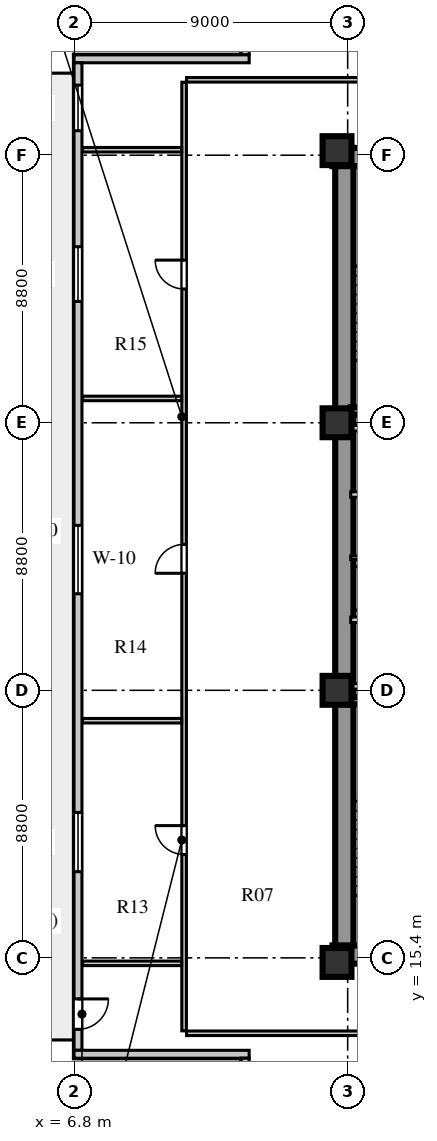
"""IFC4 building model, lengths in metres.
Left out: names, types, materials, properties, quantities, classifications, styles, units other than length and angle.
Written with IfcOpenShell. Run it as: python <this file> out.ifc"""

import sys

from ifc_helpers import new_model, si_unit, direction, frame, frame_2d, origin, origin_2d, place, context, subcontext, project, spatial, rectangle, extrude, element, fill, save


model = new_model("IFC4")
c1 = context("Model", 3, precision=1e-05, world=origin(), true_north=direction((0.0, 1.0)))
c2 = subcontext(c1, "Body", "Model", "MODEL_VIEW")
j1 = project(units=[si_unit("LENGTHUNIT", "METRE"), si_unit("PLANEANGLEUNIT", "RADIAN")], contexts=[c1])
p1 = place(None, origin())
s1 = spatial("IfcSite", under=j1, at=p1, CompositionType="ELEMENT")
p2 = place(p1, origin())
s2 = spatial("IfcBuilding", under=s1, at=p2, CompositionType="ELEMENT")
p3 = place(p2, frame((0.0, 0.0, 58.0)))
s3 = spatial("IfcBuildingStorey", under=s2, at=p3, CompositionType="ELEMENT", Elevation=58.0)
for number, where, z_axis, x_axis in (
    (1, (15.3, 15.51, 0.0), (0.0, 0.0, 1.0), (1.0, 0.0, 0.0)),
    (2, (15.3, 41.74, 0.0), (0.0, 0.0, 1.0), (1.0, 0.0, 0.0)),
):
    element("IfcWall", number, at=place(p3, frame(where, z_axis=z_axis, x_axis=x_axis)), inside=s3, PredefinedType="SHEAR", context=c2, shape_type="SweptSolid", body=[
        extrude(rectangle(XDim=9.88, YDim=0.6, at=frame_2d((4.94, 0.0))), origin(), (0.0, 0.0, 1.0), 3.72),
    ])
p4 = place(p3, frame((15.69, 15.81, 0.0), z_axis=(0.0, 0.0, 1.0), x_axis=(0.0, 1.0, 0.0)))
e3 = element("IfcWall", 3, at=p4, inside=s3, PredefinedType="SHEAR", context=c2, shape_type="SweptSolid", body=[
    extrude(rectangle(XDim=25.63, YDim=0.6, at=frame_2d((12.815, 0.0))), origin(), (0.0, 0.0, 1.0), 3.72),
])
for number, where, z_axis, x_axis in (
    (4, (15.45, 15.25, 0.0), (0.0, 0.0, 1.0), (1.0, 0.0, 0.0)),
    (5, (15.45, 24.2, 0.0), (0.0, 0.0, 1.0), (1.0, 0.0, 0.0)),
    (6, (15.45, 33.0, 0.0), (0.0, 0.0, 1.0), (1.0, 0.0, 0.0)),
    (7, (15.45, 41.95, 0.0), (0.0, 0.0, 1.0), (1.0, 0.0, 0.0)),
):
    element("IfcColumn", number, at=place(p3, frame(where, z_axis=z_axis, x_axis=x_axis)), inside=s3, PredefinedType="COLUMN", context=c2, shape_type="SweptSolid", body=[
        extrude(rectangle(XDim=0.95, YDim=0.95, at=origin_2d()), origin(), (0.0, 0.0, 1.0), 3.72),
    ])
p5 = place(p3, frame((12.43, 50.34, 0.0), z_axis=(0.0, 0.0, 1.0), x_axis=(0.0, -1.0, 0.0)))
e8 = element("IfcWall", 8, at=p5, inside=s3, PredefinedType="SOLIDWALL", context=c2, shape_type="SweptSolid", body=[
    extrude(rectangle(XDim=5.24, YDim=0.26, at=frame_2d((2.62, 0.0))), origin(), (0.0, 0.0, 1.0), 3.72),
])
p6 = place(p3, frame((12.56, 44.97, 0.0), z_axis=(0.0, 0.0, 1.0), x_axis=(-1.0, 0.0, 0.0)))
e9 = element("IfcWall", 9, at=p6, inside=s3, PredefinedType="SOLIDWALL", context=c2, shape_type="SweptSolid", body=[
    extrude(rectangle(XDim=5.76, YDim=0.26, at=frame_2d((2.88, 0.0))), origin(), (0.0, 0.0, 1.0), 3.72),
])
p7 = place(p3, frame((6.93, 44.84, 0.0), z_axis=(0.0, 0.0, 1.0), x_axis=(0.0, -1.0, 0.0)))
e10 = element("IfcWall", 10, at=p7, inside=s3, PredefinedType="SOLIDWALL", context=c2, shape_type="SweptSolid", body=[
    extrude(rectangle(XDim=32.48, YDim=0.26, at=frame_2d((16.24, 0.0))), origin(), (0.0, 0.0, 1.0), 3.72),
])
p8 = place(p7, frame((30.79, 0.0, 0.0)))
e11 = element("IfcOpeningElement", 11, at=p8, cuts=e10, PredefinedType="OPENING", context=c2, shape_type="SweptSolid", body=[
    extrude(rectangle(XDim=1.0, YDim=2.05, at=frame_2d((0.5, 1.025))), frame((0.0, 0.14, 0.0), z_axis=(0.0, -1.0, 0.0), x_axis=(1.0, 0.0, 0.0)), (0.0, 0.0, 1.0), 0.28),
])
p9 = place(p7, frame((24.655, 0.0, 0.8)))
e12 = element("IfcOpeningElement", 12, at=p9, cuts=e10, PredefinedType="OPENING", context=c2, shape_type="SweptSolid", body=[
    extrude(rectangle(XDim=1.95, YDim=2.0, at=frame_2d((0.975, 1.0))), frame((0.0, 0.14, 0.0), z_axis=(0.0, -1.0, 0.0), x_axis=(1.0, 0.0, 0.0)), (0.0, 0.0, 1.0), 0.28),
])
p10 = place(p7, frame((15.215, 0.0, 0.8)))
e13 = element("IfcOpeningElement", 13, at=p10, cuts=e10, PredefinedType="OPENING", context=c2, shape_type="SweptSolid", body=[
    extrude(rectangle(XDim=2.25, YDim=2.0, at=frame_2d((1.125, 1.0))), frame((0.0, 0.14, 0.0), z_axis=(0.0, -1.0, 0.0), x_axis=(1.0, 0.0, 0.0)), (0.0, 0.0, 1.0), 0.28),
])
p11 = place(p7, frame((6.05, 0.0, 0.8)))
e14 = element("IfcOpeningElement", 14, at=p11, cuts=e10, PredefinedType="OPENING", context=c2, shape_type="SweptSolid", body=[
    extrude(rectangle(XDim=1.8, YDim=2.0, at=frame_2d((0.9, 1.0))), frame((0.0, 0.14, 0.0), z_axis=(0.0, -1.0, 0.0), x_axis=(1.0, 0.0, 0.0)), (0.0, 0.0, 1.0), 0.28),
])
p12 = place(p7, frame((0.735, 0.0, 0.8)))
e15 = element("IfcOpeningElement", 15, at=p12, cuts=e10, PredefinedType="OPENING", context=c2, shape_type="SweptSolid", body=[
    extrude(rectangle(XDim=1.5, YDim=2.0, at=frame_2d((0.75, 1.0))), frame((0.0, 0.14, 0.0), z_axis=(0.0, -1.0, 0.0), x_axis=(1.0, 0.0, 0.0)), (0.0, 0.0, 1.0), 0.28),
])
p13 = place(p3, frame((6.8, 12.23, 0.0), z_axis=(0.0, 0.0, 1.0), x_axis=(1.0, 0.0, 0.0)))
e16 = element("IfcWall", 16, at=p13, inside=s3, PredefinedType="SOLIDWALL", context=c2, shape_type="SweptSolid", body=[
    extrude(rectangle(XDim=5.76, YDim=0.26, at=frame_2d((2.88, 0.0))), origin(), (0.0, 0.0, 1.0), 3.72),
])
p14 = place(p3, frame((12.43, 12.1, 0.0), z_axis=(0.0, 0.0, 1.0), x_axis=(0.0, -1.0, 0.0)))
e17 = element("IfcWall", 17, at=p14, inside=s3, PredefinedType="SOLIDWALL", context=c2, shape_type="SweptSolid", body=[
    extrude(rectangle(XDim=5.24, YDim=0.26, at=frame_2d((2.62, 0.0))), origin(), (0.0, 0.0, 1.0), 3.72),
])
p15 = place(p3, frame((15.9, 23.86, 0.0), z_axis=(0.0, 0.0, 1.0), x_axis=(1.0, 0.0, 0.0)))
e18 = element("IfcWall", 18, at=p15, inside=s3, PredefinedType="SHEAR", context=c2, shape_type="SweptSolid", body=[
    extrude(rectangle(XDim=3.52, YDim=0.24, at=frame_2d((1.76, 0.0))), origin(), (0.0, 0.0, 1.0), 4.0),
])
p16 = place(p3, frame((15.9, 26.52, 0.0), z_axis=(0.0, 0.0, 1.0), x_axis=(1.0, 0.0, 0.0)))
e19 = element("IfcWall", 19, at=p16, inside=s3, PredefinedType="SOLIDWALL", context=c2, shape_type="SweptSolid", body=[
    extrude(rectangle(XDim=8.68, YDim=0.18, at=frame_2d((4.34, 0.0))), origin(), (0.0, 0.0, 1.0), 3.72),
])
p17 = place(p16, frame((1.76, 0.0, 0.0)))
e20 = element("IfcOpeningElement", 20, at=p17, cuts=e19, PredefinedType="OPENING", context=c2, shape_type="SweptSolid", body=[
    extrude(rectangle(XDim=1.0, YDim=2.1, at=frame_2d((0.5, 1.05))), frame((0.0, 0.1, 0.0), z_axis=(0.0, -1.0, 0.0), x_axis=(1.0, 0.0, 0.0)), (0.0, 0.0, 1.0), 0.2),
])
p18 = place(p16, frame((3.6, 0.0, 0.0)))
e21 = element("IfcOpeningElement", 21, at=p18, cuts=e19, PredefinedType="OPENING", context=c2, shape_type="SweptSolid", body=[
    extrude(rectangle(XDim=1.0, YDim=2.1, at=frame_2d((0.5, 1.05))), frame((0.0, 0.1, 0.0), z_axis=(0.0, -1.0, 0.0), x_axis=(1.0, 0.0, 0.0)), (0.0, 0.0, 1.0), 0.2),
])
p19 = place(p16, frame((5.44, 0.0, 0.0)))
e22 = element("IfcOpeningElement", 22, at=p19, cuts=e19, PredefinedType="OPENING", context=c2, shape_type="SweptSolid", body=[
    extrude(rectangle(XDim=1.0, YDim=2.1, at=frame_2d((0.5, 1.05))), frame((0.0, 0.1, 0.0), z_axis=(0.0, -1.0, 0.0), x_axis=(1.0, 0.0, 0.0)), (0.0, 0.0, 1.0), 0.2),
])
p20 = place(p16, frame((7.28, 0.0, 0.0)))
e23 = element("IfcOpeningElement", 23, at=p20, cuts=e19, PredefinedType="OPENING", context=c2, shape_type="SweptSolid", body=[
    extrude(rectangle(XDim=1.0, YDim=2.1, at=frame_2d((0.5, 1.05))), frame((0.0, 0.1, 0.0), z_axis=(0.0, -1.0, 0.0), x_axis=(1.0, 0.0, 0.0)), (0.0, 0.0, 1.0), 0.2),
])
p21 = place(p3, frame((15.9, 24.33, 0.0), z_axis=(0.0, 0.0, 1.0), x_axis=(1.0, 0.0, 0.0)))
e24 = element("IfcWall", 24, at=p21, inside=s3, PredefinedType="SOLIDWALL", context=c2, shape_type="SweptSolid", body=[
    extrude(rectangle(XDim=8.68, YDim=0.18, at=frame_2d((4.34, 0.0))), origin(), (0.0, 0.0, 1.0), 3.02),
])
p22 = place(p3, frame((15.9, 28.56, 0.0), z_axis=(0.0, 0.0, 1.0), x_axis=(1.0, 0.0, 0.0)))
e25 = element("IfcWall", 25, at=p22, inside=s3, PredefinedType="PARTITIONING", context=c2, shape_type="SweptSolid", body=[
    extrude(rectangle(XDim=1.2, YDim=0.12, at=frame_2d((0.6, 0.0))), origin(), (0.0, 0.0, 1.0), 3.72),
])
p23 = place(p3, frame((15.9, 30.64, 0.0), z_axis=(0.0, 0.0, 1.0), x_axis=(1.0, 0.0, 0.0)))
e26 = element("IfcWall", 26, at=p23, inside=s3, PredefinedType="SOLIDWALL", context=c2, shape_type="SweptSolid", body=[
    extrude(rectangle(XDim=8.68, YDim=0.18, at=frame_2d((4.34, 0.0))), origin(), (0.0, 0.0, 1.0), 3.72),
])
p24 = place(p23, frame((1.76, 0.0, 0.0)))
e27 = element("IfcOpeningElement", 27, at=p24, cuts=e26, PredefinedType="OPENING", context=c2, shape_type="SweptSolid", body=[
    extrude(rectangle(XDim=1.0, YDim=2.1, at=frame_2d((0.5, 1.05))), frame((0.0, 0.1, 0.0), z_axis=(0.0, -1.0, 0.0), x_axis=(1.0, 0.0, 0.0)), (0.0, 0.0, 1.0), 0.2),
])
p25 = place(p23, frame((3.6, 0.0, 0.0)))
e28 = element("IfcOpeningElement", 28, at=p25, cuts=e26, PredefinedType="OPENING", context=c2, shape_type="SweptSolid", body=[
    extrude(rectangle(XDim=1.0, YDim=2.1, at=frame_2d((0.5, 1.05))), frame((0.0, 0.1, 0.0), z_axis=(0.0, -1.0, 0.0), x_axis=(1.0, 0.0, 0.0)), (0.0, 0.0, 1.0), 0.2),
])
p26 = place(p23, frame((5.44, 0.0, 0.0)))
e29 = element("IfcOpeningElement", 29, at=p26, cuts=e26, PredefinedType="OPENING", context=c2, shape_type="SweptSolid", body=[
    extrude(rectangle(XDim=1.0, YDim=2.1, at=frame_2d((0.5, 1.05))), frame((0.0, 0.1, 0.0), z_axis=(0.0, -1.0, 0.0), x_axis=(1.0, 0.0, 0.0)), (0.0, 0.0, 1.0), 0.2),
])
p27 = place(p23, frame((7.28, 0.0, 0.0)))
e30 = element("IfcOpeningElement", 30, at=p27, cuts=e26, PredefinedType="OPENING", context=c2, shape_type="SweptSolid", body=[
    extrude(rectangle(XDim=1.0, YDim=2.1, at=frame_2d((0.5, 1.05))), frame((0.0, 0.1, 0.0), z_axis=(0.0, -1.0, 0.0), x_axis=(1.0, 0.0, 0.0)), (0.0, 0.0, 1.0), 0.2),
])
p28 = place(p3, frame((15.9, 32.82, 0.0), z_axis=(0.0, 0.0, 1.0), x_axis=(1.0, 0.0, 0.0)))
e31 = element("IfcWall", 31, at=p28, inside=s3, PredefinedType="SOLIDWALL", context=c2, shape_type="SweptSolid", body=[
    extrude(rectangle(XDim=8.68, YDim=0.18, at=frame_2d((4.34, 0.0))), origin(), (0.0, 0.0, 1.0), 3.02),
])
p29 = place(p3, frame((15.9, 33.39, 0.0), z_axis=(0.0, 0.0, 1.0), x_axis=(1.0, 0.0, 0.0)))
e32 = element("IfcWall", 32, at=p29, inside=s3, PredefinedType="SHEAR", context=c2, shape_type="SweptSolid", body=[
    extrude(rectangle(XDim=3.52, YDim=0.24, at=frame_2d((1.76, 0.0))), origin(), (0.0, 0.0, 1.0), 4.0),
])
p30 = place(p3, frame((10.42, 13.0, 0.0), z_axis=(0.0, 0.0, 1.0), x_axis=(0.0, 1.0, 0.0)))
e33 = element("IfcWall", 33, at=p30, inside=s3, PredefinedType="PARTITIONING", context=c2, shape_type="SweptSolid", body=[
    extrude(rectangle(XDim=31.2, YDim=0.15, at=frame_2d((15.6, 0.0))), origin(), (0.0, 0.0, 1.0), 3.72),
])
p31 = place(p30, frame((5.8, 0.0, 0.0)))
e34 = element("IfcOpeningElement", 34, at=p31, cuts=e33, PredefinedType="OPENING", context=c2, shape_type="SweptSolid", body=[
    extrude(rectangle(XDim=0.95, YDim=2.08, at=frame_2d((0.475, 1.04))), frame((0.0, 0.085, 0.0), z_axis=(0.0, -1.0, 0.0), x_axis=(1.0, 0.0, 0.0)), (0.0, 0.0, 1.0), 0.17),
])
p32 = place(p30, frame((15.05, 0.0, 0.0)))
e35 = element("IfcOpeningElement", 35, at=p32, cuts=e33, PredefinedType="OPENING", context=c2, shape_type="SweptSolid", body=[
    extrude(rectangle(XDim=0.95, YDim=2.08, at=frame_2d((0.475, 1.04))), frame((0.0, 0.085, 0.0), z_axis=(0.0, -1.0, 0.0), x_axis=(1.0, 0.0, 0.0)), (0.0, 0.0, 1.0), 0.17),
])
p33 = place(p30, frame((24.4, 0.0, 0.0)))
e36 = element("IfcOpeningElement", 36, at=p33, cuts=e33, PredefinedType="OPENING", context=c2, shape_type="SweptSolid", body=[
    extrude(rectangle(XDim=0.95, YDim=2.08, at=frame_2d((0.475, 1.04))), frame((0.0, 0.085, 0.0), z_axis=(0.0, -1.0, 0.0), x_axis=(1.0, 0.0, 0.0)), (0.0, 0.0, 1.0), 0.17),
])
for number, where, z_axis, x_axis in (
    (37, (7.08, 15.22, 0.0), (0.0, 0.0, 1.0), (1.0, 0.0, 0.0)),
    (38, (7.08, 41.98, 0.0), (0.0, 0.0, 1.0), (1.0, 0.0, 0.0)),
):
    element("IfcWall", number, at=place(p3, frame(where, z_axis=z_axis, x_axis=x_axis)), inside=s3, PredefinedType="PARTITIONING", context=c2, shape_type="SweptSolid", body=[
        extrude(rectangle(XDim=3.26, YDim=0.15, at=frame_2d((1.63, 0.0))), origin(), (0.0, 0.0, 1.0), 3.22),
    ])
p34 = place(p3, frame((10.5, 12.92, 0.0), z_axis=(0.0, 0.0, 1.0), x_axis=(1.0, 0.0, 0.0)))
e39 = element("IfcWall", 39, at=p34, inside=s3, PredefinedType="PARTITIONING", context=c2, shape_type="SweptSolid", body=[
    extrude(rectangle(XDim=14.7, YDim=0.15, at=frame_2d((7.35, 0.0))), origin(), (0.0, 0.0, 1.0), 3.72),
])
p35 = place(p34, frame((6.2, 0.0, 0.0)))
e40 = element("IfcOpeningElement", 40, at=p35, cuts=e39, PredefinedType="OPENING", context=c2, shape_type="SweptSolid", body=[
    extrude(rectangle(XDim=1.0, YDim=2.08, at=frame_2d((0.5, 1.04))), frame((0.0, 0.085, 0.0), z_axis=(0.0, -1.0, 0.0), x_axis=(1.0, 0.0, 0.0)), (0.0, 0.0, 1.0), 0.17),
])
p36 = place(p3, frame((10.5, 44.28, 0.0), z_axis=(0.0, 0.0, 1.0), x_axis=(1.0, 0.0, 0.0)))
e41 = element("IfcWall", 41, at=p36, inside=s3, PredefinedType="PARTITIONING", context=c2, shape_type="SweptSolid", body=[
    extrude(rectangle(XDim=14.7, YDim=0.15, at=frame_2d((7.35, 0.0))), origin(), (0.0, 0.0, 1.0), 3.72),
])
p37 = place(p36, frame((6.2, 0.0, 0.0)))
e42 = element("IfcOpeningElement", 42, at=p37, cuts=e41, PredefinedType="OPENING", context=c2, shape_type="SweptSolid", body=[
    extrude(rectangle(XDim=1.0, YDim=2.08, at=frame_2d((0.5, 1.04))), frame((0.0, 0.085, 0.0), z_axis=(0.0, -1.0, 0.0), x_axis=(1.0, 0.0, 0.0)), (0.0, 0.0, 1.0), 0.17),
])
for number, where, z_axis, x_axis in (
    (43, (7.08, 23.2, 0.0), (0.0, 0.0, 1.0), (1.0, 0.0, 0.0)),
    (44, (7.08, 33.8, 0.0), (0.0, 0.0, 1.0), (1.0, 0.0, 0.0)),
):
    element("IfcWall", number, at=place(p3, frame(where, z_axis=z_axis, x_axis=x_axis)), inside=s3, PredefinedType="PARTITIONING", context=c2, shape_type="SweptSolid", body=[
        extrude(rectangle(XDim=3.26, YDim=0.15, at=frame_2d((1.63, 0.0))), origin(), (0.0, 0.0, 1.0), 3.72),
    ])
p38 = place(p8, frame((1.0, 0.0, 0.0), z_axis=(0.0, 0.0, 1.0), x_axis=(-1.0, 0.0, 0.0)))
e45 = element("IfcDoor", 45, at=p38, inside=s3, OperationType="SINGLE_SWING_RIGHT", PredefinedType="DOOR", context=c2, shape_type="SweptSolid", body=[
    extrude(rectangle(XDim=1.0, YDim=2.05, at=frame_2d((0.5, 1.025))), frame((0.0, 0.025, 0.0), z_axis=(0.0, -1.0, 0.0), x_axis=(1.0, 0.0, 0.0)), (0.0, 0.0, 1.0), 0.05),
])
fill(e11, e45)
p39 = place(p9, origin())
e46 = element("IfcWindow", 46, at=p39, inside=s3, PartitioningType="SINGLE_PANEL", PredefinedType="WINDOW", context=c2, shape_type="SweptSolid", body=[
    extrude(rectangle(XDim=1.95, YDim=2.0, at=frame_2d((0.975, 1.0))), frame((0.0, 0.03, 0.0), z_axis=(0.0, -1.0, 0.0), x_axis=(1.0, 0.0, 0.0)), (0.0, 0.0, 1.0), 0.06),
])
fill(e12, e46)
p40 = place(p10, origin())
e47 = element("IfcWindow", 47, at=p40, inside=s3, PartitioningType="SINGLE_PANEL", PredefinedType="WINDOW", context=c2, shape_type="SweptSolid", body=[
    extrude(rectangle(XDim=2.25, YDim=2.0, at=frame_2d((1.125, 1.0))), frame((0.0, 0.03, 0.0), z_axis=(0.0, -1.0, 0.0), x_axis=(1.0, 0.0, 0.0)), (0.0, 0.0, 1.0), 0.06),
])
fill(e13, e47)
p41 = place(p11, origin())
e48 = element("IfcWindow", 48, at=p41, inside=s3, PartitioningType="SINGLE_PANEL", PredefinedType="WINDOW", context=c2, shape_type="SweptSolid", body=[
    extrude(rectangle(XDim=1.8, YDim=2.0, at=frame_2d((0.9, 1.0))), frame((0.0, 0.03, 0.0), z_axis=(0.0, -1.0, 0.0), x_axis=(1.0, 0.0, 0.0)), (0.0, 0.0, 1.0), 0.06),
])
fill(e14, e48)
p42 = place(p12, origin())
e49 = element("IfcWindow", 49, at=p42, inside=s3, PartitioningType="SINGLE_PANEL", PredefinedType="WINDOW", context=c2, shape_type="SweptSolid", body=[
    extrude(rectangle(XDim=1.5, YDim=2.0, at=frame_2d((0.75, 1.0))), frame((0.0, 0.03, 0.0), z_axis=(0.0, -1.0, 0.0), x_axis=(1.0, 0.0, 0.0)), (0.0, 0.0, 1.0), 0.06),
])
fill(e15, e49)
p43 = place(p31, frame((0.95, 0.0, 0.0), z_axis=(0.0, 0.0, 1.0), x_axis=(-1.0, 0.0, 0.0)))
e50 = element("IfcDoor", 50, at=p43, inside=s3, OperationType="SINGLE_SWING_LEFT", PredefinedType="DOOR", context=c2, shape_type="SweptSolid", body=[
    extrude(rectangle(XDim=0.95, YDim=2.08, at=frame_2d((0.475, 1.04))), frame((0.0, 0.025, 0.0), z_axis=(0.0, -1.0, 0.0), x_axis=(1.0, 0.0, 0.0)), (0.0, 0.0, 1.0), 0.05),
])
fill(e34, e50)
p44 = place(p32, frame((0.95, 0.0, 0.0), z_axis=(0.0, 0.0, 1.0), x_axis=(-1.0, 0.0, 0.0)))
e51 = element("IfcDoor", 51, at=p44, inside=s3, OperationType="SINGLE_SWING_RIGHT", PredefinedType="DOOR", context=c2, shape_type="SweptSolid", body=[
    extrude(rectangle(XDim=0.95, YDim=2.08, at=frame_2d((0.475, 1.04))), frame((0.0, 0.025, 0.0), z_axis=(0.0, -1.0, 0.0), x_axis=(1.0, 0.0, 0.0)), (0.0, 0.0, 1.0), 0.05),
])
fill(e35, e51)
p45 = place(p33, frame((0.95, 0.0, 0.0), z_axis=(0.0, 0.0, 1.0), x_axis=(-1.0, 0.0, 0.0)))
e52 = element("IfcDoor", 52, at=p45, inside=s3, OperationType="SINGLE_SWING_LEFT", PredefinedType="DOOR", context=c2, shape_type="SweptSolid", body=[
    extrude(rectangle(XDim=0.95, YDim=2.08, at=frame_2d((0.475, 1.04))), frame((0.0, 0.025, 0.0), z_axis=(0.0, -1.0, 0.0), x_axis=(1.0, 0.0, 0.0)), (0.0, 0.0, 1.0), 0.05),
])
fill(e36, e52)
save(model, sys.argv[1])
